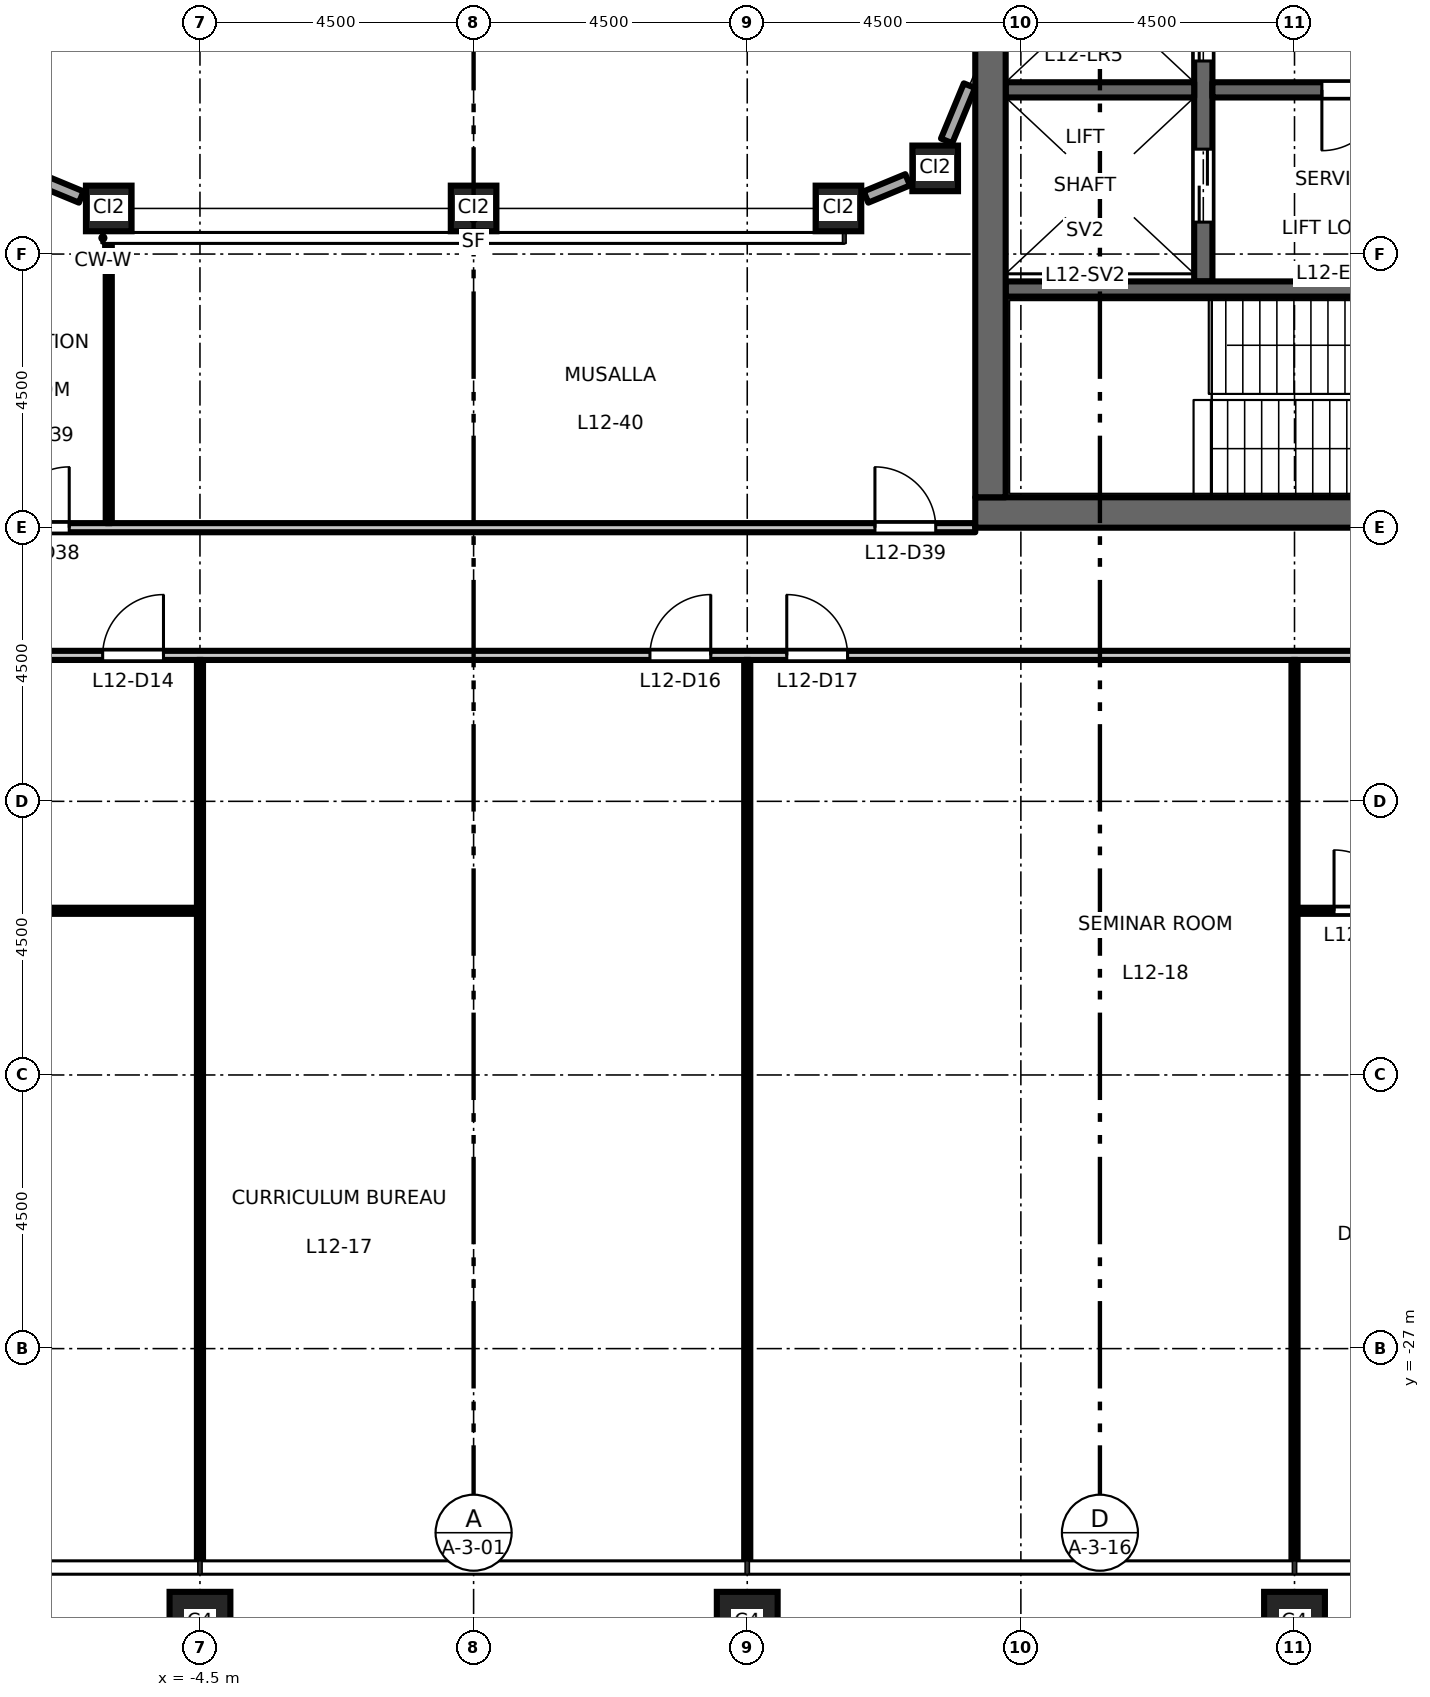
"""IFC4 building model, lengths in metres.
Left out: names, types, materials, properties, quantities, classifications, styles, units other than length and angle.
Written with IfcOpenShell. Run it as: python <this file> out.ifc"""

import sys

from ifc_helpers import new_model, si_unit, direction, frame, frame_2d, origin, origin_2d, place, context, subcontext, project, spatial, rectangle, hollow_rectangle, extrude, element, fill, save


model = new_model("IFC4")
c1 = context("Model", 3, precision=1e-05, world=origin(), true_north=direction((0.0, 1.0)))
c2 = subcontext(c1, "Body", "Model", "MODEL_VIEW")
j1 = project(units=[si_unit("LENGTHUNIT", "METRE"), si_unit("PLANEANGLEUNIT", "RADIAN")], contexts=[c1])
p1 = place(None, origin())
s1 = spatial("IfcSite", under=j1, at=p1, CompositionType="ELEMENT")
p2 = place(p1, origin())
s2 = spatial("IfcBuilding", under=s1, at=p2, CompositionType="ELEMENT")
p3 = place(p2, frame((0.0, 0.0, 58.2)))
s3 = spatial("IfcBuildingStorey", under=s2, at=p3, CompositionType="ELEMENT", Elevation=58.2)
for number, where, z_axis, x_axis in (
    (1, (-4.5, -31.5, 0.0), (0.0, 0.0, 1.0), (1.0, 0.0, 0.0)),
    (2, (4.5, -31.5, 0.0), (0.0, 0.0, 1.0), (1.0, 0.0, 0.0)),
    (3, (13.5, -31.5, 0.0), (0.0, 0.0, 1.0), (1.0, 0.0, 0.0)),
):
    element("IfcColumn", number, at=place(p3, frame(where, z_axis=z_axis, x_axis=x_axis)), inside=s3, PredefinedType="COLUMN", context=c2, shape_type="SweptSolid", body=[
        extrude(hollow_rectangle(XDim=1.0, YDim=1.0, WallThickness=0.06, at=origin_2d()), origin(), (0.0, 0.0, 1.0), 4.5),
    ])
for number, where, z_axis, x_axis in (
    (4, (-6.0, -8.25, 0.0), (0.0, 0.0, 1.0), (1.0, 0.0, 0.0)),
    (5, (0.0, -8.25, 0.0), (0.0, 0.0, 1.0), (1.0, 0.0, 0.0)),
    (6, (6.0, -8.25, 0.0), (0.0, 0.0, 1.0), (1.0, 0.0, 0.0)),
    (7, (7.591, -7.591, 0.0), (0.0, 0.0, 1.0), (1.0, 0.0, 0.0)),
):
    element("IfcColumn", number, at=place(p3, frame(where, z_axis=z_axis, x_axis=x_axis)), inside=s3, PredefinedType="COLUMN", context=c2, shape_type="SweptSolid", body=[
        extrude(hollow_rectangle(XDim=0.75, YDim=0.75, WallThickness=0.045, at=origin_2d()), origin(), (0.0, 0.0, 1.0), 4.5),
    ])
p4 = place(p3, frame((12.0, -9.45, 0.0), z_axis=(0.0, 0.0, 1.0), x_axis=(0.0, 1.0, 0.0)))
e8 = element("IfcWall", 8, at=p4, inside=s3, PredefinedType="SHEAR", context=c2, shape_type="SweptSolid", body=[
    extrude(rectangle(XDim=18.9, YDim=0.3, at=frame_2d((9.45, 0.0))), origin(), (0.0, 0.0, 1.0), 4.35),
])
p5 = place(p4, frame((3.625, 0.0, 0.0)))
e9 = element("IfcOpeningElement", 9, at=p5, cuts=e8, PredefinedType="OPENING", context=c2, shape_type="SweptSolid", body=[
    extrude(rectangle(XDim=1.1, YDim=2.1, at=frame_2d((0.55, 1.05))), frame((0.0, 0.16, 0.0), z_axis=(0.0, -1.0, 0.0), x_axis=(1.0, 0.0, 0.0)), (0.0, 0.0, 1.0), 0.32),
])
p6 = place(p4, frame((6.775, 0.0, 0.0)))
e10 = element("IfcOpeningElement", 10, at=p6, cuts=e8, PredefinedType="OPENING", context=c2, shape_type="SweptSolid", body=[
    extrude(rectangle(XDim=1.1, YDim=2.1, at=frame_2d((0.55, 1.05))), frame((0.0, 0.16, 0.0), z_axis=(0.0, -1.0, 0.0), x_axis=(1.0, 0.0, 0.0)), (0.0, 0.0, 1.0), 0.32),
])
p7 = place(p4, frame((9.925, 0.0, 0.0)))
e11 = element("IfcOpeningElement", 11, at=p7, cuts=e8, PredefinedType="OPENING", context=c2, shape_type="SweptSolid", body=[
    extrude(rectangle(XDim=1.1, YDim=2.1, at=frame_2d((0.55, 1.05))), frame((0.0, 0.16, 0.0), z_axis=(0.0, -1.0, 0.0), x_axis=(1.0, 0.0, 0.0)), (0.0, 0.0, 1.0), 0.32),
])
p8 = place(p4, frame((13.075, 0.0, 0.0)))
e12 = element("IfcOpeningElement", 12, at=p8, cuts=e8, PredefinedType="OPENING", context=c2, shape_type="SweptSolid", body=[
    extrude(rectangle(XDim=1.1, YDim=2.1, at=frame_2d((0.55, 1.05))), frame((0.0, 0.16, 0.0), z_axis=(0.0, -1.0, 0.0), x_axis=(1.0, 0.0, 0.0)), (0.0, 0.0, 1.0), 0.32),
])
p9 = place(p4, frame((16.725, 0.0, 0.0)))
e13 = element("IfcOpeningElement", 13, at=p9, cuts=e8, PredefinedType="OPENING", context=c2, shape_type="SweptSolid", body=[
    extrude(rectangle(XDim=1.2, YDim=2.1, at=frame_2d((0.6, 1.05))), frame((0.0, 0.16, 0.0), z_axis=(0.0, -1.0, 0.0), x_axis=(1.0, 0.0, 0.0)), (0.0, 0.0, 1.0), 0.32),
])
p10 = place(p4, frame((0.975, 0.0, 0.0)))
e14 = element("IfcOpeningElement", 14, at=p10, cuts=e8, PredefinedType="OPENING", context=c2, shape_type="SweptSolid", body=[
    extrude(rectangle(XDim=1.2, YDim=2.1, at=frame_2d((0.6, 1.05))), frame((0.0, 0.16, 0.0), z_axis=(0.0, -1.0, 0.0), x_axis=(1.0, 0.0, 0.0)), (0.0, 0.0, 1.0), 0.32),
])
p11 = place(p3, frame((12.15, -6.3, 0.0), z_axis=(0.0, 0.0, 1.0), x_axis=(1.0, 0.0, 0.0)))
e15 = element("IfcWall", 15, at=p11, inside=s3, PredefinedType="SHEAR", context=c2, shape_type="SweptSolid", body=[
    extrude(rectangle(XDim=9.1, YDim=0.25, at=frame_2d((4.55, 0.0))), origin(), (0.0, 0.0, 1.0), 4.35),
])
p12 = place(p11, frame((1.8, 0.0, 0.0)))
e16 = element("IfcOpeningElement", 16, at=p12, cuts=e15, PredefinedType="OPENING", context=c2, shape_type="SweptSolid", body=[
    extrude(rectangle(XDim=1.0, YDim=2.1, at=frame_2d((0.5, 1.05))), frame((0.0, 0.135, 0.0), z_axis=(0.0, -1.0, 0.0), x_axis=(1.0, 0.0, 0.0)), (0.0, 0.0, 1.0), 0.27),
])
p13 = place(p3, frame((8.75, -6.3, 0.0), z_axis=(0.0, 0.0, 1.0), x_axis=(1.0, 0.0, 0.0)))
e17 = element("IfcWall", 17, at=p13, inside=s3, PredefinedType="SHEAR", context=c2, shape_type="SweptSolid", body=[
    extrude(rectangle(XDim=3.1, YDim=0.25, at=frame_2d((1.55, 0.0))), origin(), (0.0, 0.0, 1.0), 4.35),
])
p14 = place(p3, frame((8.75, -9.575, 0.0), z_axis=(0.0, 0.0, 1.0), x_axis=(1.0, 0.0, 0.0)))
e18 = element("IfcWall", 18, at=p14, inside=s3, PredefinedType="SHEAR", context=c2, shape_type="SweptSolid", body=[
    extrude(rectangle(XDim=8.0, YDim=0.25, at=frame_2d((4.0, 0.0))), origin(), (0.0, 0.0, 1.0), 4.35),
])
p15 = place(p14, frame((6.65, 0.0, 0.0)))
e19 = element("IfcOpeningElement", 19, at=p15, cuts=e18, PredefinedType="OPENING", context=c2, shape_type="SweptSolid", body=[
    extrude(rectangle(XDim=1.1, YDim=2.1, at=frame_2d((0.55, 1.05))), frame((0.0, 0.135, 0.0), z_axis=(0.0, -1.0, 0.0), x_axis=(1.0, 0.0, 0.0)), (0.0, 0.0, 1.0), 0.27),
])
p16 = place(p3, frame((8.25, -13.25, 0.0), z_axis=(0.0, 0.0, 1.0), x_axis=(1.0, 0.0, 0.0)))
e20 = element("IfcWall", 20, at=p16, inside=s3, PredefinedType="SHEAR", context=c2, shape_type="SweptSolid", body=[
    extrude(rectangle(XDim=13.5, YDim=0.5, at=frame_2d((6.75, 0.0))), origin(), (0.0, 0.0, 1.0), 4.35),
])
p17 = place(p3, frame((8.5, -13.0, 0.0), z_axis=(0.0, 0.0, 1.0), x_axis=(0.0, 1.0, 0.0)))
e21 = element("IfcWall", 21, at=p17, inside=s3, PredefinedType="SHEAR", context=c2, shape_type="SweptSolid", body=[
    extrude(rectangle(XDim=26.0, YDim=0.5, at=frame_2d((13.0, 0.0))), origin(), (0.0, 0.0, 1.0), 4.35),
])
p18 = place(p3, frame((6.453, -8.062, 0.0), z_axis=(0.0, 0.0, 1.0), x_axis=(0.923940677943, 0.382535780864, 0.0)))
e22 = element("IfcWall", 22, at=p18, inside=s3, PredefinedType="STANDARD", context=c2, shape_type="SweptSolid", body=[
    extrude(rectangle(XDim=0.742, YDim=0.2, at=frame_2d((0.371, 0.0))), origin(), (0.0, 0.0, 1.0), 3.73),
])
p19 = place(p3, frame((7.779, -7.138, 0.0), z_axis=(0.0, 0.0, 1.0), x_axis=(0.382549378284, 0.923935048136, 0.0)))
e23 = element("IfcWall", 23, at=p19, inside=s3, PredefinedType="STANDARD", context=c2, shape_type="SweptSolid", body=[
    extrude(rectangle(XDim=0.982, YDim=0.2, at=frame_2d((0.491, 0.0))), origin(), (0.0, 0.0, 1.0), 3.73),
])
p20 = place(p3, frame((-7.138, -7.779, 0.0), z_axis=(0.0, 0.0, 1.0), x_axis=(0.923940677943, -0.382535780864, 0.0)))
e24 = element("IfcWall", 24, at=p20, inside=s3, PredefinedType="STANDARD", context=c2, shape_type="SweptSolid", body=[
    extrude(rectangle(XDim=0.742, YDim=0.2, at=frame_2d((0.371, 0.0))), origin(), (0.0, 0.0, 1.0), 3.73),
])
p21 = place(p3, frame((-13.45, -19.8, 0.0), z_axis=(0.0, 0.0, 1.0), x_axis=(1.0, 0.0, 0.0)))
e25 = element("IfcWall", 25, at=p21, inside=s3, PredefinedType="PARTITIONING", context=c2, shape_type="SweptSolid", body=[
    extrude(rectangle(XDim=8.9, YDim=0.1, at=frame_2d((4.45, 0.0))), origin(), (0.0, 0.0, 1.0), 4.35),
])
p22 = place(p21, frame((0.6, 0.0, 0.0)))
e26 = element("IfcOpeningElement", 26, at=p22, cuts=e25, PredefinedType="OPENING", context=c2, shape_type="SweptSolid", body=[
    extrude(rectangle(XDim=1.0, YDim=2.1, at=frame_2d((0.5, 1.05))), frame((0.0, 0.06, 0.0), z_axis=(0.0, -1.0, 0.0), x_axis=(1.0, 0.0, 0.0)), (0.0, 0.0, 1.0), 0.12),
])
p23 = place(p3, frame((13.55, -19.8, 0.0), z_axis=(0.0, 0.0, 1.0), x_axis=(1.0, 0.0, 0.0)))
e27 = element("IfcWall", 27, at=p23, inside=s3, PredefinedType="PARTITIONING", context=c2, shape_type="SweptSolid", body=[
    extrude(rectangle(XDim=8.9, YDim=0.1, at=frame_2d((4.45, 0.0))), origin(), (0.0, 0.0, 1.0), 4.35),
])
p24 = place(p23, frame((0.6, 0.0, 0.0)))
e28 = element("IfcOpeningElement", 28, at=p24, cuts=e27, PredefinedType="OPENING", context=c2, shape_type="SweptSolid", body=[
    extrude(rectangle(XDim=1.0, YDim=2.1, at=frame_2d((0.5, 1.05))), frame((0.0, 0.06, 0.0), z_axis=(0.0, -1.0, 0.0), x_axis=(1.0, 0.0, 0.0)), (0.0, 0.0, 1.0), 0.12),
])
p25 = place(p3, frame((-23.925, -15.6, 0.0), z_axis=(0.0, 0.0, 1.0), x_axis=(1.0, 0.0, 0.0)))
e29 = element("IfcWall", 29, at=p25, inside=s3, PredefinedType="PARTITIONING", context=c2, shape_type="SweptSolid", body=[
    extrude(rectangle(XDim=47.85, YDim=0.15, at=frame_2d((23.925, 0.0))), origin(), (0.0, 0.0, 1.0), 4.35),
])
p26 = place(p25, frame((8.825, 0.0, 0.0)))
e30 = element("IfcOpeningElement", 30, at=p26, cuts=e29, PredefinedType="OPENING", context=c2, shape_type="SweptSolid", body=[
    extrude(rectangle(XDim=1.0, YDim=2.1, at=frame_2d((0.5, 1.05))), frame((0.0, 0.085, 0.0), z_axis=(0.0, -1.0, 0.0), x_axis=(1.0, 0.0, 0.0)), (0.0, 0.0, 1.0), 0.17),
])
p27 = place(p25, frame((17.825, 0.0, 0.0)))
e31 = element("IfcOpeningElement", 31, at=p27, cuts=e29, PredefinedType="OPENING", context=c2, shape_type="SweptSolid", body=[
    extrude(rectangle(XDim=1.0, YDim=2.1, at=frame_2d((0.5, 1.05))), frame((0.0, 0.085, 0.0), z_axis=(0.0, -1.0, 0.0), x_axis=(1.0, 0.0, 0.0)), (0.0, 0.0, 1.0), 0.17),
])
p28 = place(p25, frame((26.825, 0.0, 0.0)))
e32 = element("IfcOpeningElement", 32, at=p28, cuts=e29, PredefinedType="OPENING", context=c2, shape_type="SweptSolid", body=[
    extrude(rectangle(XDim=1.0, YDim=2.1, at=frame_2d((0.5, 1.05))), frame((0.0, 0.085, 0.0), z_axis=(0.0, -1.0, 0.0), x_axis=(1.0, 0.0, 0.0)), (0.0, 0.0, 1.0), 0.17),
])
p29 = place(p25, frame((29.075, 0.0, 0.0)))
e33 = element("IfcOpeningElement", 33, at=p29, cuts=e29, PredefinedType="OPENING", context=c2, shape_type="SweptSolid", body=[
    extrude(rectangle(XDim=1.0, YDim=2.1, at=frame_2d((0.5, 1.05))), frame((0.0, 0.085, 0.0), z_axis=(0.0, -1.0, 0.0), x_axis=(1.0, 0.0, 0.0)), (0.0, 0.0, 1.0), 0.17),
])
p30 = place(p25, frame((44.825, 0.0, 0.0)))
e34 = element("IfcOpeningElement", 34, at=p30, cuts=e29, PredefinedType="OPENING", context=c2, shape_type="SweptSolid", body=[
    extrude(rectangle(XDim=1.0, YDim=2.1, at=frame_2d((0.5, 1.05))), frame((0.0, 0.085, 0.0), z_axis=(0.0, -1.0, 0.0), x_axis=(1.0, 0.0, 0.0)), (0.0, 0.0, 1.0), 0.17),
])
p31 = place(p3, frame((-8.25, -13.5, 0.0), z_axis=(0.0, 0.0, 1.0), x_axis=(1.0, 0.0, 0.0)))
e35 = element("IfcWall", 35, at=p31, inside=s3, PredefinedType="PARTITIONING", context=c2, shape_type="SweptSolid", body=[
    extrude(rectangle(XDim=16.5, YDim=0.15, at=frame_2d((8.25, 0.0))), origin(), (0.0, 0.0, 1.0), 3.85),
])
p32 = place(p31, frame((0.6, 0.0, 0.0)))
e36 = element("IfcOpeningElement", 36, at=p32, cuts=e35, PredefinedType="OPENING", context=c2, shape_type="SweptSolid", body=[
    extrude(rectangle(XDim=1.0, YDim=2.1, at=frame_2d((0.5, 1.05))), frame((0.0, 0.085, 0.0), z_axis=(0.0, -1.0, 0.0), x_axis=(1.0, 0.0, 0.0)), (0.0, 0.0, 1.0), 0.17),
])
p33 = place(p31, frame((14.85, 0.0, 0.0)))
e37 = element("IfcOpeningElement", 37, at=p33, cuts=e35, PredefinedType="OPENING", context=c2, shape_type="SweptSolid", body=[
    extrude(rectangle(XDim=1.0, YDim=2.1, at=frame_2d((0.5, 1.05))), frame((0.0, 0.085, 0.0), z_axis=(0.0, -1.0, 0.0), x_axis=(1.0, 0.0, 0.0)), (0.0, 0.0, 1.0), 0.17),
])
p34 = place(p3, frame((-6.0, -13.425, 0.0), z_axis=(0.0, 0.0, 1.0), x_axis=(0.0, 1.0, 0.0)))
e38 = element("IfcWall", 38, at=p34, inside=s3, PredefinedType="PARTITIONING", context=c2, shape_type="SweptSolid", body=[
    extrude(rectangle(XDim=4.725, YDim=0.1, at=frame_2d((2.363, 0.0))), origin(), (0.0, 0.0, 1.0), 4.35),
])
for number, where, z_axis, x_axis in (
    (39, (-4.5, -30.51, 0.0), (0.0, 0.0, 1.0), (0.0, 1.0, 0.0)),
    (40, (4.5, -30.51, 0.0), (0.0, 0.0, 1.0), (0.0, 1.0, 0.0)),
    (41, (13.5, -30.51, 0.0), (0.0, 0.0, 1.0), (0.0, 1.0, 0.0)),
):
    element("IfcWall", number, at=place(p3, frame(where, z_axis=z_axis, x_axis=x_axis)), inside=s3, PredefinedType="PARTITIONING", context=c2, shape_type="SweptSolid", body=[
        extrude(rectangle(XDim=14.835, YDim=0.1, at=frame_2d((7.417, 0.0))), origin(), (0.0, 0.0, 1.0), 3.35),
    ])
p35 = place(p12, origin())
e42 = element("IfcDoor", 42, at=p35, inside=s3, OperationType="SINGLE_SWING_LEFT", PredefinedType="DOOR", context=c2, shape_type="SweptSolid", body=[
    extrude(rectangle(XDim=1.0, YDim=2.1, at=frame_2d((0.5, 1.05))), frame((0.0, 0.025, 0.0), z_axis=(0.0, -1.0, 0.0), x_axis=(1.0, 0.0, 0.0)), (0.0, 0.0, 1.0), 0.05),
])
fill(e16, e42)
p36 = place(p5, origin())
e43 = element("IfcDoor", 43, at=p36, inside=s3, OperationType="DOUBLE_DOOR_SLIDING", PredefinedType="DOOR", context=c2, shape_type="SweptSolid", body=[
    extrude(rectangle(XDim=1.1, YDim=2.1, at=frame_2d((0.55, 1.05))), frame((0.0, 0.025, 0.0), z_axis=(0.0, -1.0, 0.0), x_axis=(1.0, 0.0, 0.0)), (0.0, 0.0, 1.0), 0.05),
])
fill(e9, e43)
p37 = place(p10, origin())
e44 = element("IfcDoor", 44, at=p37, inside=s3, OperationType="DOUBLE_DOOR_SLIDING", PredefinedType="DOOR", context=c2, shape_type="SweptSolid", body=[
    extrude(rectangle(XDim=1.2, YDim=2.1, at=frame_2d((0.6, 1.05))), frame((0.0, 0.025, 0.0), z_axis=(0.0, -1.0, 0.0), x_axis=(1.0, 0.0, 0.0)), (0.0, 0.0, 1.0), 0.05),
])
fill(e14, e44)
p38 = place(p27, origin())
e45 = element("IfcDoor", 45, at=p38, inside=s3, OperationType="SINGLE_SWING_RIGHT", PredefinedType="DOOR", context=c2, shape_type="SweptSolid", body=[
    extrude(rectangle(XDim=1.0, YDim=2.1, at=frame_2d((0.5, 1.05))), frame((0.0, 0.025, 0.0), z_axis=(0.0, -1.0, 0.0), x_axis=(1.0, 0.0, 0.0)), (0.0, 0.0, 1.0), 0.05),
])
fill(e31, e45)
p39 = place(p28, origin())
e46 = element("IfcDoor", 46, at=p39, inside=s3, OperationType="SINGLE_SWING_RIGHT", PredefinedType="DOOR", context=c2, shape_type="SweptSolid", body=[
    extrude(rectangle(XDim=1.0, YDim=2.1, at=frame_2d((0.5, 1.05))), frame((0.0, 0.025, 0.0), z_axis=(0.0, -1.0, 0.0), x_axis=(1.0, 0.0, 0.0)), (0.0, 0.0, 1.0), 0.05),
])
fill(e32, e46)
p40 = place(p29, origin())
e47 = element("IfcDoor", 47, at=p40, inside=s3, OperationType="SINGLE_SWING_LEFT", PredefinedType="DOOR", context=c2, shape_type="SweptSolid", body=[
    extrude(rectangle(XDim=1.0, YDim=2.1, at=frame_2d((0.5, 1.05))), frame((0.0, 0.025, 0.0), z_axis=(0.0, -1.0, 0.0), x_axis=(1.0, 0.0, 0.0)), (0.0, 0.0, 1.0), 0.05),
])
fill(e33, e47)
p41 = place(p24, origin())
e48 = element("IfcDoor", 48, at=p41, inside=s3, OperationType="SINGLE_SWING_LEFT", PredefinedType="DOOR", context=c2, shape_type="SweptSolid", body=[
    extrude(rectangle(XDim=1.0, YDim=2.1, at=frame_2d((0.5, 1.05))), frame((0.0, 0.025, 0.0), z_axis=(0.0, -1.0, 0.0), x_axis=(1.0, 0.0, 0.0)), (0.0, 0.0, 1.0), 0.05),
])
fill(e28, e48)
p42 = place(p32, origin())
e49 = element("IfcDoor", 49, at=p42, inside=s3, OperationType="SINGLE_SWING_RIGHT", PredefinedType="DOOR", context=c2, shape_type="SweptSolid", body=[
    extrude(rectangle(XDim=1.0, YDim=2.1, at=frame_2d((0.5, 1.05))), frame((0.0, 0.025, 0.0), z_axis=(0.0, -1.0, 0.0), x_axis=(1.0, 0.0, 0.0)), (0.0, 0.0, 1.0), 0.05),
])
fill(e36, e49)
p43 = place(p33, origin())
e50 = element("IfcDoor", 50, at=p43, inside=s3, OperationType="SINGLE_SWING_LEFT", PredefinedType="DOOR", context=c2, shape_type="SweptSolid", body=[
    extrude(rectangle(XDim=1.0, YDim=2.1, at=frame_2d((0.5, 1.05))), frame((0.0, 0.025, 0.0), z_axis=(0.0, -1.0, 0.0), x_axis=(1.0, 0.0, 0.0)), (0.0, 0.0, 1.0), 0.05),
])
fill(e37, e50)
save(model, sys.argv[1])
